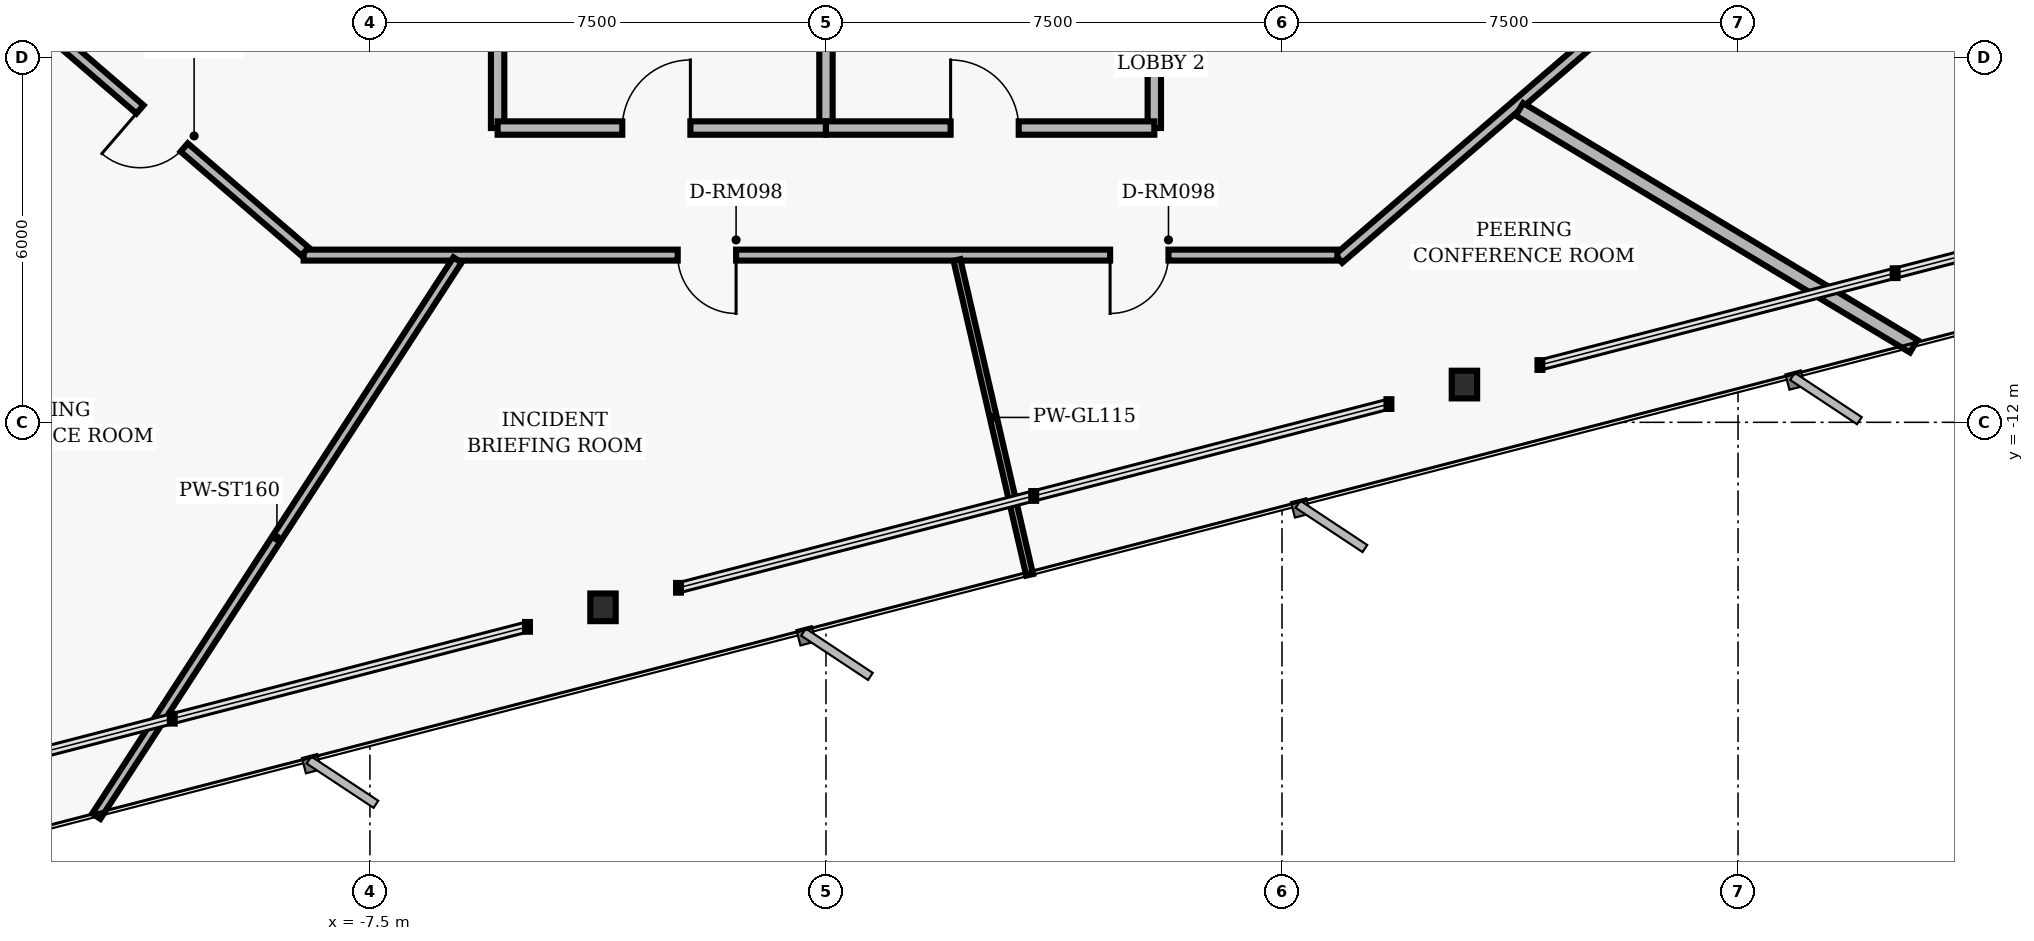
"""IFC4 building model, lengths in metres.
Left out: names, types, materials, properties, quantities, classifications, styles, units other than length and angle.
Written with IfcOpenShell. Run it as: python <this file> out.ifc"""

import sys

from ifc_helpers import new_model, si_unit, direction, frame, frame_2d, origin, origin_2d, place, context, subcontext, project, spatial, rectangle, i_section, extrude, element, fill, save


model = new_model("IFC4")
c1 = context("Model", 3, precision=1e-05, world=origin(), true_north=direction((0.0, 1.0)))
c2 = subcontext(c1, "Body", "Model", "MODEL_VIEW")
j1 = project(units=[si_unit("LENGTHUNIT", "METRE"), si_unit("PLANEANGLEUNIT", "RADIAN")], contexts=[c1])
p1 = place(None, origin())
s1 = spatial("IfcSite", under=j1, at=p1, CompositionType="ELEMENT")
p2 = place(p1, origin())
s2 = spatial("IfcBuilding", under=s1, at=p2, CompositionType="ELEMENT")
p3 = place(p2, frame((0.0, 0.0, 82.56)))
s3 = spatial("IfcBuildingStorey", under=s2, at=p3, CompositionType="ELEMENT", Elevation=82.56)
for number, where, z_axis, x_axis in (
    (1, (-3.667, -15.043, 0.0), (0.0, 0.0, 1.0), (1.0, 0.0, 0.0)),
    (2, (10.5, -11.379, 0.0), (0.0, 0.0, 1.0), (1.0, 0.0, 0.0)),
):
    element("IfcColumn", number, at=place(p3, frame(where, z_axis=z_axis, x_axis=x_axis)), inside=s3, PredefinedType="COLUMN", context=c2, shape_type="SweptSolid", body=[
        extrude(i_section(OverallWidth=0.418, OverallDepth=0.455, WebThickness=0.042, FlangeThickness=0.068, FilletRadius=0.025, at=origin_2d()), origin(), (0.0, 0.0, 1.0), 3.04),
    ])
for number, where, z_axis, x_axis in (
    (3, (-5.4, -7.16, 0.0), (0.0, 0.0, 1.0), (0.0, 1.0, 0.0)),
    (4, (5.4, -7.16, 0.0), (0.0, 0.0, 1.0), (0.0, 1.0, 0.0)),
):
    element("IfcWall", number, at=place(p3, frame(where, z_axis=z_axis, x_axis=x_axis)), inside=s3, PredefinedType="PARTITIONING", context=c2, shape_type="SweptSolid", body=[
        extrude(rectangle(XDim=2.71, YDim=0.22, at=frame_2d((1.355, 0.0))), origin(), (0.0, 0.0, 1.0), 2.763),
    ])
p4 = place(p3, frame((0.0, -7.16, 0.0), z_axis=(0.0, 0.0, 1.0), x_axis=(0.0, 1.0, 0.0)))
e5 = element("IfcWall", 5, at=p4, inside=s3, PredefinedType="PARTITIONING", context=c2, shape_type="SweptSolid", body=[
    extrude(rectangle(XDim=2.81, YDim=0.22, at=frame_2d((1.405, 0.0))), origin(), (0.0, 0.0, 1.0), 2.763),
])
p5 = place(p3, frame((-5.4, -7.16, 0.0), z_axis=(0.0, 0.0, 1.0), x_axis=(1.0, 0.0, 0.0)))
e6 = element("IfcWall", 6, at=p5, inside=s3, PredefinedType="PARTITIONING", context=c2, shape_type="SweptSolid", body=[
    extrude(rectangle(XDim=5.4, YDim=0.22, at=frame_2d((2.7, 0.0))), origin(), (0.0, 0.0, 1.0), 2.763),
])
p6 = place(p5, frame((2.05, 0.0, 0.0)))
e7 = element("IfcOpeningElement", 7, at=p6, cuts=e6, PredefinedType="OPENING", context=c2, shape_type="SweptSolid", body=[
    extrude(rectangle(XDim=1.12, YDim=2.02, at=frame_2d((0.56, 1.01))), frame((0.0, 0.12, 0.0), z_axis=(0.0, -1.0, 0.0), x_axis=(1.0, 0.0, 0.0)), (0.0, 0.0, 1.0), 0.24),
])
p7 = place(p3, frame((0.0, -7.16, 0.0), z_axis=(0.0, 0.0, 1.0), x_axis=(1.0, 0.0, 0.0)))
e8 = element("IfcWall", 8, at=p7, inside=s3, PredefinedType="PARTITIONING", context=c2, shape_type="SweptSolid", body=[
    extrude(rectangle(XDim=5.4, YDim=0.22, at=frame_2d((2.7, 0.0))), origin(), (0.0, 0.0, 1.0), 2.763),
])
p8 = place(p7, frame((2.05, 0.0, 0.0)))
e9 = element("IfcOpeningElement", 9, at=p8, cuts=e8, PredefinedType="OPENING", context=c2, shape_type="SweptSolid", body=[
    extrude(rectangle(XDim=1.12, YDim=2.02, at=frame_2d((0.56, 1.01))), frame((0.0, 0.12, 0.0), z_axis=(0.0, -1.0, 0.0), x_axis=(1.0, 0.0, 0.0)), (0.0, 0.0, 1.0), 0.24),
])
p9 = place(p3, frame((13.268, -5.141, 0.0), z_axis=(0.0, 0.0, 1.0), x_axis=(-0.757534501725, -0.65279512766, 0.0)))
e10 = element("IfcWall", 10, at=p9, inside=s3, PredefinedType="PARTITIONING", context=c2, shape_type="SweptSolid", body=[
    extrude(rectangle(XDim=6.385, YDim=0.18, at=frame_2d((3.192, 0.0))), origin(), (0.0, 0.0, 1.0), 2.763),
])
p10 = place(p3, frame((8.41, -9.25, 0.0), z_axis=(0.0, 0.0, 1.0), x_axis=(-1.0, 0.0, 0.0)))
e11 = element("IfcWall", 11, at=p10, inside=s3, PredefinedType="PARTITIONING", context=c2, shape_type="SweptSolid", body=[
    extrude(rectangle(XDim=17.0, YDim=0.18, at=frame_2d((8.5, 0.0))), origin(), (0.0, 0.0, 1.0), 2.277),
])
p11 = place(p10, frame((9.888, 0.0, 0.0)))
e12 = element("IfcOpeningElement", 12, at=p11, cuts=e11, PredefinedType="OPENING", context=c2, shape_type="SweptSolid", body=[
    extrude(rectangle(XDim=0.96, YDim=2.02, at=frame_2d((0.48, 1.01))), frame((0.0, 0.1, 0.0), z_axis=(0.0, -1.0, 0.0), x_axis=(1.0, 0.0, 0.0)), (0.0, 0.0, 1.0), 0.2),
])
p12 = place(p10, frame((2.777, 0.0, 0.0)))
e13 = element("IfcOpeningElement", 13, at=p12, cuts=e11, PredefinedType="OPENING", context=c2, shape_type="SweptSolid", body=[
    extrude(rectangle(XDim=0.96, YDim=2.02, at=frame_2d((0.48, 1.01))), frame((0.0, 0.1, 0.0), z_axis=(0.0, -1.0, 0.0), x_axis=(1.0, 0.0, 0.0)), (0.0, 0.0, 1.0), 0.2),
])
p13 = place(p3, frame((-8.568, -9.191, 0.0), z_axis=(0.0, 0.0, 1.0), x_axis=(-0.757556899173, 0.652769135694, 0.0)))
e14 = element("IfcWall", 14, at=p13, inside=s3, PredefinedType="PARTITIONING", context=c2, shape_type="SweptSolid", body=[
    extrude(rectangle(XDim=6.204, YDim=0.18, at=frame_2d((3.102, 0.0))), origin(), (0.0, 0.0, 1.0), 2.763),
])
p14 = place(p13, frame((2.622, 0.0, 0.0)))
e15 = element("IfcOpeningElement", 15, at=p14, cuts=e14, PredefinedType="OPENING", context=c2, shape_type="SweptSolid", body=[
    extrude(rectangle(XDim=0.96, YDim=2.02, at=frame_2d((0.48, 1.01))), frame((0.0, 0.1, 0.0), z_axis=(0.0, -1.0, 0.0), x_axis=(1.0, 0.0, 0.0)), (0.0, 0.0, 1.0), 0.2),
])
p15 = place(p3, frame((-6.059, -9.33, 0.0), z_axis=(0.0, 0.0, 1.0), x_axis=(-0.544635087887, -0.838673131227, 0.0)))
e16 = element("IfcWall", 16, at=p15, inside=s3, PredefinedType="PARTITIONING", context=c2, shape_type="SweptSolid", body=[
    extrude(rectangle(XDim=10.908, YDim=0.16, at=frame_2d((5.454, 0.0))), origin(), (0.0, 0.0, 1.0), 2.763),
])
p16 = place(p3, frame((2.154, -9.33, 0.0), z_axis=(0.0, 0.0, 1.0), x_axis=(0.22493330832, -0.974374161607, 0.0)))
e17 = element("IfcWall", 17, at=p16, inside=s3, PredefinedType="MOVABLE", context=c2, shape_type="SweptSolid", body=[
    extrude(rectangle(XDim=5.315, YDim=0.115, at=frame_2d((2.658, 0.0))), origin(), (0.0, 0.0, 1.0), 2.763),
])
p17 = place(p3, frame((11.405, -6.853, 0.0), z_axis=(0.0, 0.0, 1.0), x_axis=(0.857165278127, -0.515041441025, 0.0)))
e18 = element("IfcWall", 18, at=p17, inside=s3, PredefinedType="PARTITIONING", context=c2, shape_type="SweptSolid", body=[
    extrude(rectangle(XDim=7.565, YDim=0.24, at=frame_2d((3.782, 0.0))), origin(), (0.0, 0.0, 1.0), 2.763),
])
p18 = place(p6, origin())
e19 = element("IfcDoor", 19, at=p18, inside=s3, OperationType="SINGLE_SWING_RIGHT", PredefinedType="DOOR", context=c2, shape_type="SweptSolid", body=[
    extrude(rectangle(XDim=1.12, YDim=2.02, at=frame_2d((0.56, 1.01))), frame((0.0, 0.025, 0.0), z_axis=(0.0, -1.0, 0.0), x_axis=(1.0, 0.0, 0.0)), (0.0, 0.0, 1.0), 0.05),
])
fill(e7, e19)
p19 = place(p8, origin())
e20 = element("IfcDoor", 20, at=p19, inside=s3, OperationType="SINGLE_SWING_LEFT", PredefinedType="DOOR", context=c2, shape_type="SweptSolid", body=[
    extrude(rectangle(XDim=1.12, YDim=2.02, at=frame_2d((0.56, 1.01))), frame((0.0, 0.025, 0.0), z_axis=(0.0, -1.0, 0.0), x_axis=(1.0, 0.0, 0.0)), (0.0, 0.0, 1.0), 0.05),
])
fill(e9, e20)
p20 = place(p14, origin())
e21 = element("IfcDoor", 21, at=p20, inside=s3, OperationType="SINGLE_SWING_RIGHT", PredefinedType="DOOR", context=c2, shape_type="SweptSolid", body=[
    extrude(rectangle(XDim=0.96, YDim=2.02, at=frame_2d((0.48, 1.01))), frame((0.0, 0.025, 0.0), z_axis=(0.0, -1.0, 0.0), x_axis=(1.0, 0.0, 0.0)), (0.0, 0.0, 1.0), 0.05),
])
fill(e15, e21)
p21 = place(p11, origin())
e22 = element("IfcDoor", 22, at=p21, inside=s3, OperationType="SINGLE_SWING_LEFT", PredefinedType="DOOR", context=c2, shape_type="SweptSolid", body=[
    extrude(rectangle(XDim=0.96, YDim=2.02, at=frame_2d((0.48, 1.01))), frame((0.0, 0.025, 0.0), z_axis=(0.0, -1.0, 0.0), x_axis=(1.0, 0.0, 0.0)), (0.0, 0.0, 1.0), 0.05),
])
fill(e12, e22)
p22 = place(p12, origin())
e23 = element("IfcDoor", 23, at=p22, inside=s3, OperationType="SINGLE_SWING_RIGHT", PredefinedType="DOOR", context=c2, shape_type="SweptSolid", body=[
    extrude(rectangle(XDim=0.96, YDim=2.02, at=frame_2d((0.48, 1.01))), frame((0.0, 0.025, 0.0), z_axis=(0.0, -1.0, 0.0), x_axis=(1.0, 0.0, 0.0)), (0.0, 0.0, 1.0), 0.05),
])
fill(e13, e23)
save(model, sys.argv[1])
